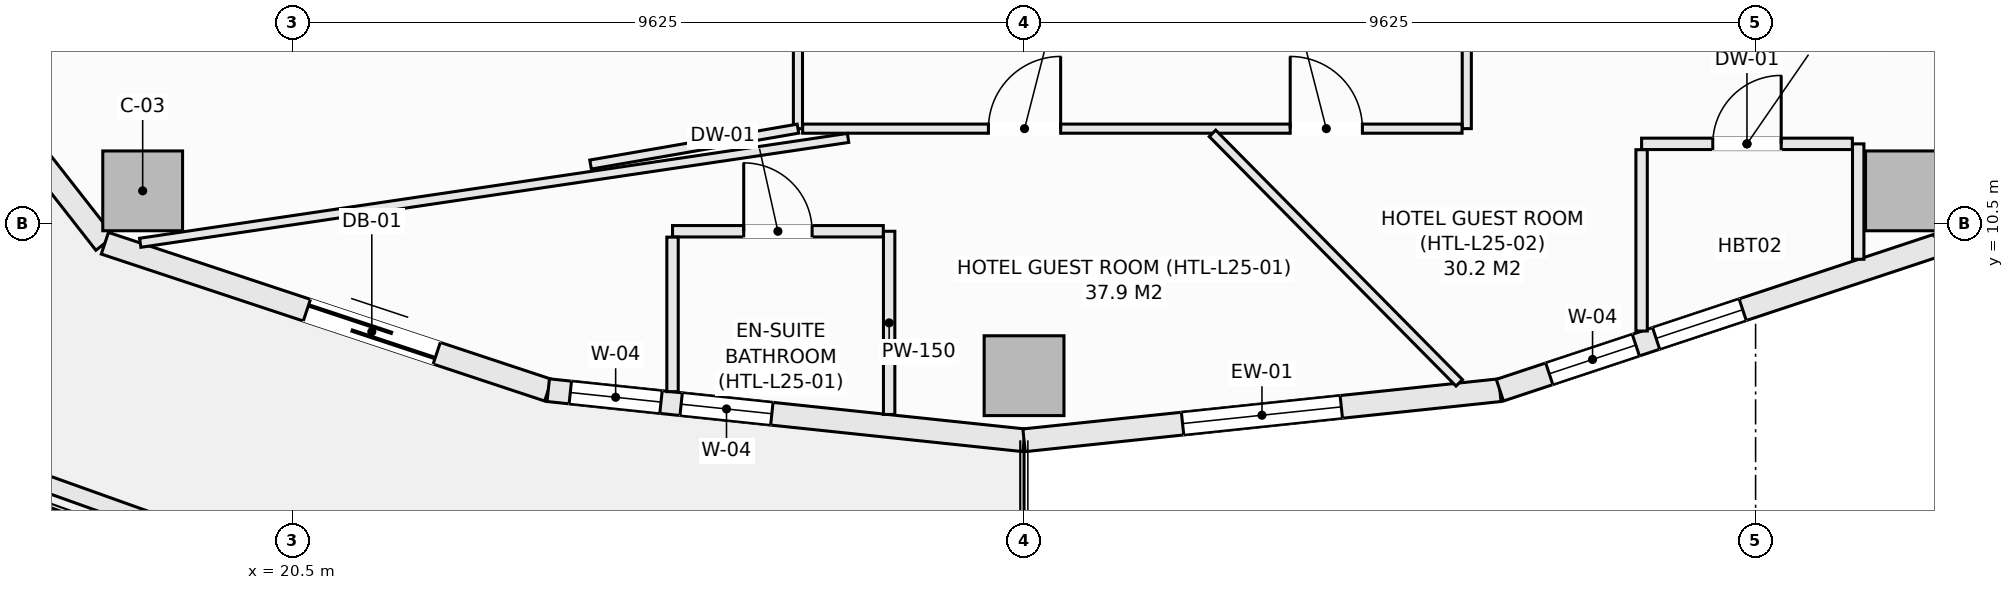
"""IFC4 building model, lengths in metres.
Left out: names, types, materials, properties, quantities, classifications, styles, units other than length and angle.
Written with IfcOpenShell. Run it as: python <this file> out.ifc"""

import sys

from ifc_helpers import new_model, si_unit, direction, frame, frame_2d, origin, origin_2d, place, context, subcontext, project, spatial, rectangle, extrude, element, fill, save


model = new_model("IFC4")
c1 = context("Model", 3, precision=1e-05, world=origin(), true_north=direction((0.0, 1.0)))
c2 = subcontext(c1, "Body", "Model", "MODEL_VIEW")
j1 = project(units=[si_unit("LENGTHUNIT", "METRE"), si_unit("PLANEANGLEUNIT", "RADIAN")], contexts=[c1])
p1 = place(None, origin())
s1 = spatial("IfcSite", under=j1, at=p1, CompositionType="ELEMENT")
p2 = place(p1, origin())
s2 = spatial("IfcBuilding", under=s1, at=p2, CompositionType="ELEMENT")
p3 = place(p2, frame((0.0, 0.0, 105.3)))
s3 = spatial("IfcBuildingStorey", under=s2, at=p3, CompositionType="ELEMENT", Elevation=105.3)
for number, where, z_axis, x_axis in (
    (1, (18.529, 10.932, -0.27), (0.0, 0.0, 1.0), (1.0, 0.0, 0.0)),
    (2, (30.125, 8.5, -0.27), (0.0, 0.0, 1.0), (1.0, 0.0, 0.0)),
    (3, (41.721, 10.932, -0.27), (0.0, 0.0, 1.0), (1.0, 0.0, 0.0)),
):
    element("IfcColumn", number, at=place(p3, frame(where, z_axis=z_axis, x_axis=x_axis)), inside=s3, PredefinedType="COLUMN", context=c2, shape_type="SweptSolid", body=[
        extrude(rectangle(XDim=1.05, YDim=1.05, at=origin_2d()), origin(), (0.0, 0.0, 1.0), 3.4),
    ])
p4 = place(p3, frame((14.481, 14.777, 0.0), z_axis=(0.0, 0.0, 1.0), x_axis=(0.616435134162, -0.787405693001, 0.0)))
e4 = element("IfcWall", 4, at=p4, inside=s3, PredefinedType="SOLIDWALL", context=c2, shape_type="SweptSolid", body=[
    extrude(rectangle(XDim=5.759, YDim=0.3, at=frame_2d((2.879, 0.0))), origin(), (0.0, 0.0, 1.0), 2.653),
])
p5 = place(p4, frame((1.829, 0.0, 0.74)))
e5 = element("IfcOpeningElement", 5, at=p5, cuts=e4, PredefinedType="OPENING", context=c2, shape_type="SweptSolid", body=[
    extrude(rectangle(XDim=2.1, YDim=1.7, at=frame_2d((1.05, 0.85))), frame((0.0, 0.16, 0.0), z_axis=(0.0, -1.0, 0.0), x_axis=(1.0, 0.0, 0.0)), (0.0, 0.0, 1.0), 0.32),
])
p6 = place(p3, frame((18.031, 10.242, 0.0), z_axis=(0.0, 0.0, 1.0), x_axis=(0.949238009374, -0.314558741032, 0.0)))
e6 = element("IfcWall", 6, at=p6, inside=s3, PredefinedType="SOLIDWALL", context=c2, shape_type="SweptSolid", body=[
    extrude(rectangle(XDim=6.146, YDim=0.3, at=frame_2d((3.073, 0.0))), origin(), (0.0, 0.0, 1.0), 2.653),
])
p7 = place(p6, frame((2.8, 0.0, 0.0)))
e7 = element("IfcOpeningElement", 7, at=p7, cuts=e6, PredefinedType="OPENING", context=c2, shape_type="SweptSolid", body=[
    extrude(rectangle(XDim=1.8, YDim=2.25, at=frame_2d((0.9, 1.125))), frame((0.0, 0.16, 0.0), z_axis=(0.0, -1.0, 0.0), x_axis=(1.0, 0.0, 0.0)), (0.0, 0.0, 1.0), 0.32),
])
p8 = place(p3, frame((23.865, 8.309, 0.0), z_axis=(0.0, 0.0, 1.0), x_axis=(0.994498012394, -0.104755445421, 0.0)))
e8 = element("IfcWall", 8, at=p8, inside=s3, PredefinedType="SOLIDWALL", context=c2, shape_type="SweptSolid", body=[
    extrude(rectangle(XDim=6.295, YDim=0.3, at=frame_2d((3.147, 0.0))), origin(), (0.0, 0.0, 1.0), 2.653),
])
p9 = place(p8, frame((0.292, 0.0, 0.74)))
e9 = element("IfcOpeningElement", 9, at=p9, cuts=e8, PredefinedType="OPENING", context=c2, shape_type="SweptSolid", body=[
    extrude(rectangle(XDim=1.2, YDim=1.7, at=frame_2d((0.6, 0.85))), frame((0.0, 0.16, 0.0), z_axis=(0.0, -1.0, 0.0), x_axis=(1.0, 0.0, 0.0)), (0.0, 0.0, 1.0), 0.32),
])
p10 = place(p8, frame((1.758, 0.0, 0.74)))
e10 = element("IfcOpeningElement", 10, at=p10, cuts=e8, PredefinedType="OPENING", context=c2, shape_type="SweptSolid", body=[
    extrude(rectangle(XDim=1.2, YDim=1.7, at=frame_2d((0.6, 0.85))), frame((0.0, 0.16, 0.0), z_axis=(0.0, -1.0, 0.0), x_axis=(1.0, 0.0, 0.0)), (0.0, 0.0, 1.0), 0.32),
])
p11 = place(p3, frame((30.125, 7.65, 0.0), z_axis=(0.0, 0.0, 1.0), x_axis=(0.994498012394, 0.104755445421, 0.0)))
e11 = element("IfcWall", 11, at=p11, inside=s3, PredefinedType="SOLIDWALL", context=c2, shape_type="SweptSolid", body=[
    extrude(rectangle(XDim=6.295, YDim=0.3, at=frame_2d((3.147, 0.0))), origin(), (0.0, 0.0, 1.0), 2.653),
])
p12 = place(p11, frame((2.097, 0.0, 0.74)))
e12 = element("IfcOpeningElement", 12, at=p12, cuts=e11, PredefinedType="OPENING", context=c2, shape_type="SweptSolid", body=[
    extrude(rectangle(XDim=2.1, YDim=1.7, at=frame_2d((1.05, 0.85))), frame((0.0, 0.16, 0.0), z_axis=(0.0, -1.0, 0.0), x_axis=(1.0, 0.0, 0.0)), (0.0, 0.0, 1.0), 0.32),
])
p13 = place(p3, frame((36.385, 8.309, 0.0), z_axis=(0.0, 0.0, 1.0), x_axis=(0.949238009374, 0.314558741032, 0.0)))
e13 = element("IfcWall", 13, at=p13, inside=s3, PredefinedType="SOLIDWALL", context=c2, shape_type="SweptSolid", body=[
    extrude(rectangle(XDim=6.146, YDim=0.3, at=frame_2d((3.073, 0.0))), origin(), (0.0, 0.0, 1.0), 2.653),
])
p14 = place(p13, frame((0.685, 0.0, 0.74)))
e14 = element("IfcOpeningElement", 14, at=p14, cuts=e13, PredefinedType="OPENING", context=c2, shape_type="SweptSolid", body=[
    extrude(rectangle(XDim=1.2, YDim=1.7, at=frame_2d((0.6, 0.85))), frame((0.0, 0.16, 0.0), z_axis=(0.0, -1.0, 0.0), x_axis=(1.0, 0.0, 0.0)), (0.0, 0.0, 1.0), 0.32),
])
p15 = place(p13, frame((2.166, 0.0, 0.74)))
e15 = element("IfcOpeningElement", 15, at=p15, cuts=e13, PredefinedType="OPENING", context=c2, shape_type="SweptSolid", body=[
    extrude(rectangle(XDim=1.2, YDim=1.7, at=frame_2d((0.6, 0.85))), frame((0.0, 0.16, 0.0), z_axis=(0.0, -1.0, 0.0), x_axis=(1.0, 0.0, 0.0)), (0.0, 0.0, 1.0), 0.32),
])
p16 = place(p3, frame((16.018, 7.523, 0.0), z_axis=(0.0, 0.0, 1.0), x_axis=(0.941632697311, -0.336642040387, 0.0)))
e16 = element("IfcWall", 16, at=p16, inside=s3, PredefinedType="PARAPET", context=c2, shape_type="SweptSolid", body=[
    extrude(rectangle(XDim=7.236, YDim=0.22, at=frame_2d((3.618, 0.0))), origin(), (0.0, 0.0, 1.0), 0.52),
])
p17 = place(p3, frame((27.15, 11.75, 0.0), z_axis=(0.0, 0.0, 1.0), x_axis=(0.0, 1.0, 0.0)))
e17 = element("IfcWall", 17, at=p17, inside=s3, PredefinedType="PARTITIONING", context=c2, shape_type="SweptSolid", body=[
    extrude(rectangle(XDim=3.05, YDim=0.12, at=frame_2d((1.525, 0.0))), origin(), (0.0, 0.0, 1.0), 3.13),
])
p18 = place(p3, frame((35.95, 11.75, 0.0), z_axis=(0.0, 0.0, 1.0), x_axis=(0.0, 1.0, 0.0)))
e18 = element("IfcWall", 18, at=p18, inside=s3, PredefinedType="PARTITIONING", context=c2, shape_type="SweptSolid", body=[
    extrude(rectangle(XDim=3.838, YDim=0.12, at=frame_2d((1.919, 0.0))), origin(), (0.0, 0.0, 1.0), 3.13),
])
p19 = place(p18, frame((1.78, 0.0, 0.0)))
e19 = element("IfcOpeningElement", 19, at=p19, cuts=e18, PredefinedType="OPENING", context=c2, shape_type="SweptSolid", body=[
    extrude(rectangle(XDim=0.95, YDim=2.1, at=frame_2d((0.475, 1.05))), frame((0.0, 0.07, 0.0), z_axis=(0.0, -1.0, 0.0), x_axis=(1.0, 0.0, 0.0)), (0.0, 0.0, 1.0), 0.14),
])
p20 = place(p3, frame((27.212, 11.75, 0.0), z_axis=(0.0, 0.0, 1.0), x_axis=(1.0, 0.0, 0.0)))
e20 = element("IfcWall", 20, at=p20, inside=s3, PredefinedType="PARTITIONING", context=c2, shape_type="SweptSolid", body=[
    extrude(rectangle(XDim=8.676, YDim=0.12, at=frame_2d((4.338, 0.0))), origin(), (0.0, 0.0, 1.0), 3.13),
])
p21 = place(p20, frame((2.444, 0.0, 0.0)))
e21 = element("IfcOpeningElement", 21, at=p21, cuts=e20, PredefinedType="OPENING", context=c2, shape_type="SweptSolid", body=[
    extrude(rectangle(XDim=0.95, YDim=2.1, at=frame_2d((0.475, 1.05))), frame((0.0, 0.07, 0.0), z_axis=(0.0, -1.0, 0.0), x_axis=(1.0, 0.0, 0.0)), (0.0, 0.0, 1.0), 0.14),
])
p22 = place(p20, frame((6.415, 0.0, 0.0)))
e22 = element("IfcOpeningElement", 22, at=p22, cuts=e20, PredefinedType="OPENING", context=c2, shape_type="SweptSolid", body=[
    extrude(rectangle(XDim=0.95, YDim=2.1, at=frame_2d((0.475, 1.05))), frame((0.0, 0.07, 0.0), z_axis=(0.0, -1.0, 0.0), x_axis=(1.0, 0.0, 0.0)), (0.0, 0.0, 1.0), 0.14),
])
p23 = place(p3, frame((18.496, 10.248, 0.0), z_axis=(0.0, 0.0, 1.0), x_axis=(0.989204993819, 0.14653832333, 0.0)))
e23 = element("IfcWall", 23, at=p23, inside=s3, PredefinedType="PARTITIONING", context=c2, shape_type="SweptSolid", body=[
    extrude(rectangle(XDim=9.415, YDim=0.12, at=frame_2d((4.708, 0.0))), origin(), (0.0, 0.0, 1.0), 2.653),
])
p24 = place(p3, frame((32.604, 11.688, 0.0), z_axis=(0.0, 0.0, 1.0), x_axis=(0.703262237237, -0.710930535057, 0.0)))
e24 = element("IfcWall", 24, at=p24, inside=s3, PredefinedType="PARTITIONING", context=c2, shape_type="SweptSolid", body=[
    extrude(rectangle(XDim=4.616, YDim=0.12, at=frame_2d((2.308, 0.0))), origin(), (0.0, 0.0, 1.0), 3.13),
])
p25 = place(p3, frame((28.35, 7.99, 0.0), z_axis=(0.0, 0.0, 1.0), x_axis=(0.0, 1.0, 0.0)))
e25 = element("IfcWall", 25, at=p25, inside=s3, PredefinedType="PARTITIONING", context=c2, shape_type="SweptSolid", body=[
    extrude(rectangle(XDim=2.41, YDim=0.15, at=frame_2d((1.205, 0.0))), origin(), (0.0, 0.0, 1.0), 3.13),
])
p26 = place(p3, frame((25.5, 10.4, 0.0), z_axis=(0.0, 0.0, 1.0), x_axis=(1.0, 0.0, 0.0)))
e26 = element("IfcWall", 26, at=p26, inside=s3, PredefinedType="PARTITIONING", context=c2, shape_type="SweptSolid", body=[
    extrude(rectangle(XDim=2.773, YDim=0.15, at=frame_2d((1.386, 0.0))), origin(), (0.0, 0.0, 1.0), 3.13),
])
p27 = place(p26, frame((0.937, 0.0, 0.0)))
e27 = element("IfcOpeningElement", 27, at=p27, cuts=e26, PredefinedType="OPENING", context=c2, shape_type="SweptSolid", body=[
    extrude(rectangle(XDim=0.9, YDim=2.1, at=frame_2d((0.45, 1.05))), frame((0.0, 0.085, 0.0), z_axis=(0.0, -1.0, 0.0), x_axis=(1.0, 0.0, 0.0)), (0.0, 0.0, 1.0), 0.17),
])
p28 = place(p3, frame((25.5, 8.29, 0.0), z_axis=(0.0, 0.0, 1.0), x_axis=(0.0, 1.0, 0.0)))
e28 = element("IfcWall", 28, at=p28, inside=s3, PredefinedType="PARTITIONING", context=c2, shape_type="SweptSolid", body=[
    extrude(rectangle(XDim=2.033, YDim=0.15, at=frame_2d((1.017, 0.0))), origin(), (0.0, 0.0, 1.0), 3.13),
])
p29 = place(p3, frame((41.1, 10.032, 0.0), z_axis=(0.0, 0.0, 1.0), x_axis=(0.0, 1.0, 0.0)))
e29 = element("IfcWall", 29, at=p29, inside=s3, PredefinedType="PARTITIONING", context=c2, shape_type="SweptSolid", body=[
    extrude(rectangle(XDim=1.518, YDim=0.15, at=frame_2d((0.759, 0.0))), origin(), (0.0, 0.0, 1.0), 2.505),
])
p30 = place(p3, frame((38.25, 11.55, 0.0), z_axis=(0.0, 0.0, 1.0), x_axis=(1.0, 0.0, 0.0)))
e30 = element("IfcWall", 30, at=p30, inside=s3, PredefinedType="PARTITIONING", context=c2, shape_type="SweptSolid", body=[
    extrude(rectangle(XDim=2.773, YDim=0.15, at=frame_2d((1.386, 0.0))), origin(), (0.0, 0.0, 1.0), 3.13),
])
p31 = place(p30, frame((0.937, 0.0, 0.0)))
e31 = element("IfcOpeningElement", 31, at=p31, cuts=e30, PredefinedType="OPENING", context=c2, shape_type="SweptSolid", body=[
    extrude(rectangle(XDim=0.9, YDim=2.1, at=frame_2d((0.45, 1.05))), frame((0.0, 0.085, 0.0), z_axis=(0.0, -1.0, 0.0), x_axis=(1.0, 0.0, 0.0)), (0.0, 0.0, 1.0), 0.17),
])
p32 = place(p3, frame((38.25, 9.087, 0.0), z_axis=(0.0, 0.0, 1.0), x_axis=(0.0, 1.0, 0.0)))
e32 = element("IfcWall", 32, at=p32, inside=s3, PredefinedType="PARTITIONING", context=c2, shape_type="SweptSolid", body=[
    extrude(rectangle(XDim=2.385, YDim=0.15, at=frame_2d((1.193, 0.0))), origin(), (0.0, 0.0, 1.0), 3.13),
])
p33 = place(p3, frame((24.421, 11.278, 0.0), z_axis=(0.0, 0.0, 1.0), x_axis=(0.98534024709, 0.170600695966, 0.0)))
e33 = element("IfcWall", 33, at=p33, inside=s3, PredefinedType="PARTITIONING", context=c2, shape_type="SweptSolid", body=[
    extrude(rectangle(XDim=2.769, YDim=0.12, at=frame_2d((1.385, 0.0))), origin(), (0.0, 0.0, 1.0), 3.13),
])
p34 = place(p7, frame((1.8, 0.0, 0.0), z_axis=(0.0, 0.0, 1.0), x_axis=(-1.0, 0.0, 0.0)))
e34 = element("IfcDoor", 34, at=p34, inside=s3, OperationType="SLIDING_TO_LEFT", PredefinedType="DOOR", context=c2, shape_type="SweptSolid", body=[
    extrude(rectangle(XDim=1.8, YDim=2.25, at=frame_2d((0.9, 1.125))), frame((0.0, 0.025, 0.0), z_axis=(0.0, -1.0, 0.0), x_axis=(1.0, 0.0, 0.0)), (0.0, 0.0, 1.0), 0.05),
])
fill(e7, e34)
p35 = place(p9, origin())
e35 = element("IfcWindow", 35, at=p35, inside=s3, PartitioningType="SINGLE_PANEL", PredefinedType="WINDOW", context=c2, shape_type="SweptSolid", body=[
    extrude(rectangle(XDim=1.2, YDim=1.7, at=frame_2d((0.6, 0.85))), frame((0.0, 0.03, 0.0), z_axis=(0.0, -1.0, 0.0), x_axis=(1.0, 0.0, 0.0)), (0.0, 0.0, 1.0), 0.06),
])
fill(e9, e35)
p36 = place(p12, origin())
e36 = element("IfcWindow", 36, at=p36, inside=s3, PartitioningType="SINGLE_PANEL", PredefinedType="WINDOW", context=c2, shape_type="SweptSolid", body=[
    extrude(rectangle(XDim=2.1, YDim=1.7, at=frame_2d((1.05, 0.85))), frame((0.0, 0.03, 0.0), z_axis=(0.0, -1.0, 0.0), x_axis=(1.0, 0.0, 0.0)), (0.0, 0.0, 1.0), 0.06),
])
fill(e12, e36)
p37 = place(p14, origin())
e37 = element("IfcWindow", 37, at=p37, inside=s3, PartitioningType="SINGLE_PANEL", PredefinedType="WINDOW", context=c2, shape_type="SweptSolid", body=[
    extrude(rectangle(XDim=1.2, YDim=1.7, at=frame_2d((0.6, 0.85))), frame((0.0, 0.03, 0.0), z_axis=(0.0, -1.0, 0.0), x_axis=(1.0, 0.0, 0.0)), (0.0, 0.0, 1.0), 0.06),
])
fill(e14, e37)
p38 = place(p21, origin())
e38 = element("IfcDoor", 38, at=p38, inside=s3, OperationType="SINGLE_SWING_RIGHT", PredefinedType="DOOR", context=c2, shape_type="SweptSolid", body=[
    extrude(rectangle(XDim=0.95, YDim=2.1, at=frame_2d((0.475, 1.05))), frame((0.0, 0.025, 0.0), z_axis=(0.0, -1.0, 0.0), x_axis=(1.0, 0.0, 0.0)), (0.0, 0.0, 1.0), 0.05),
])
fill(e21, e38)
p39 = place(p22, origin())
e39 = element("IfcDoor", 39, at=p39, inside=s3, OperationType="SINGLE_SWING_LEFT", PredefinedType="DOOR", context=c2, shape_type="SweptSolid", body=[
    extrude(rectangle(XDim=0.95, YDim=2.1, at=frame_2d((0.475, 1.05))), frame((0.0, 0.025, 0.0), z_axis=(0.0, -1.0, 0.0), x_axis=(1.0, 0.0, 0.0)), (0.0, 0.0, 1.0), 0.05),
])
fill(e22, e39)
p40 = place(p27, origin())
e40 = element("IfcDoor", 40, at=p40, inside=s3, OperationType="SINGLE_SWING_LEFT", PredefinedType="DOOR", context=c2, shape_type="SweptSolid", body=[
    extrude(rectangle(XDim=0.9, YDim=2.1, at=frame_2d((0.45, 1.05))), frame((0.0, 0.025, 0.0), z_axis=(0.0, -1.0, 0.0), x_axis=(1.0, 0.0, 0.0)), (0.0, 0.0, 1.0), 0.05),
])
fill(e27, e40)
p41 = place(p31, origin())
e41 = element("IfcDoor", 41, at=p41, inside=s3, OperationType="SINGLE_SWING_RIGHT", PredefinedType="DOOR", context=c2, shape_type="SweptSolid", body=[
    extrude(rectangle(XDim=0.9, YDim=2.1, at=frame_2d((0.45, 1.05))), frame((0.0, 0.025, 0.0), z_axis=(0.0, -1.0, 0.0), x_axis=(1.0, 0.0, 0.0)), (0.0, 0.0, 1.0), 0.05),
])
fill(e31, e41)
p42 = place(p10, origin())
e42 = element("IfcWindow", 42, at=p42, inside=s3, PartitioningType="SINGLE_PANEL", PredefinedType="WINDOW", context=c2, shape_type="SweptSolid", body=[
    extrude(rectangle(XDim=1.2, YDim=1.7, at=frame_2d((0.6, 0.85))), frame((0.0, 0.03, 0.0), z_axis=(0.0, -1.0, 0.0), x_axis=(1.0, 0.0, 0.0)), (0.0, 0.0, 1.0), 0.06),
])
fill(e10, e42)
p43 = place(p15, origin())
e43 = element("IfcWindow", 43, at=p43, inside=s3, PartitioningType="SINGLE_PANEL", PredefinedType="WINDOW", context=c2, shape_type="SweptSolid", body=[
    extrude(rectangle(XDim=1.2, YDim=1.7, at=frame_2d((0.6, 0.85))), frame((0.0, 0.03, 0.0), z_axis=(0.0, -1.0, 0.0), x_axis=(1.0, 0.0, 0.0)), (0.0, 0.0, 1.0), 0.06),
])
fill(e15, e43)
save(model, sys.argv[1])
